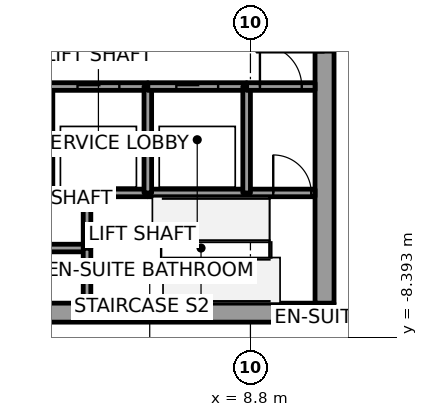
"""IFC4 building model, lengths in metres.
Left out: names, types, materials, properties, quantities, classifications, styles, units other than length and angle.
Written with IfcOpenShell. Run it as: python <this file> out.ifc"""

import sys

from ifc_helpers import new_model, si_unit, direction, frame, frame_2d, origin, place, context, subcontext, project, spatial, rectangle, extrude, element, fill, save


model = new_model("IFC4")
c1 = context("Model", 3, precision=1e-05, world=origin(), true_north=direction((0.0, 1.0)))
c2 = subcontext(c1, "Body", "Model", "MODEL_VIEW")
j1 = project(units=[si_unit("LENGTHUNIT", "METRE"), si_unit("PLANEANGLEUNIT", "RADIAN")], contexts=[c1])
p1 = place(None, origin())
s1 = spatial("IfcSite", under=j1, at=p1, CompositionType="ELEMENT")
p2 = place(p1, origin())
s2 = spatial("IfcBuilding", under=s1, at=p2, CompositionType="ELEMENT")
p3 = place(p2, frame((0.0, 0.0, 85.0)))
s3 = spatial("IfcBuildingStorey", under=s2, at=p3, CompositionType="ELEMENT", Elevation=85.0)
p4 = place(p3, frame((-11.0, -7.75, 0.0), z_axis=(0.0, 0.0, 1.0), x_axis=(1.0, 0.0, 0.0)))
e1 = element("IfcWall", 1, at=p4, inside=s3, PredefinedType="SHEAR", context=c2, shape_type="SweptSolid", body=[
    extrude(rectangle(XDim=22.0, YDim=0.5, at=frame_2d((11.0, 0.0))), origin(), (0.0, 0.0, 1.0), 3.7),
])
p5 = place(p4, frame((10.45, 0.0, 0.0)))
e2 = element("IfcOpeningElement", 2, at=p5, cuts=e1, PredefinedType="OPENING", context=c2, shape_type="SweptSolid", body=[
    extrude(rectangle(XDim=1.1, YDim=2.1, at=frame_2d((0.55, 1.05))), frame((0.0, 0.25, 0.0), z_axis=(0.0, -1.0, 0.0), x_axis=(1.0, 0.0, 0.0)), (0.0, 0.0, 1.0), 0.5),
])
p6 = place(p3, frame((10.75, -7.5, 0.0), z_axis=(0.0, 0.0, 1.0), x_axis=(0.0, 1.0, 0.0)))
e3 = element("IfcWall", 3, at=p6, inside=s3, PredefinedType="SHEAR", context=c2, shape_type="SweptSolid", body=[
    extrude(rectangle(XDim=15.0, YDim=0.5, at=frame_2d((7.5, 0.0))), origin(), (0.0, 0.0, 1.0), 3.7),
])
p7 = place(p6, frame((6.6, 0.0, 0.0)))
e4 = element("IfcOpeningElement", 4, at=p7, cuts=e3, PredefinedType="OPENING", context=c2, shape_type="SweptSolid", body=[
    extrude(rectangle(XDim=1.8, YDim=2.1, at=frame_2d((0.9, 1.05))), frame((0.0, 0.25, 0.0), z_axis=(0.0, -1.0, 0.0), x_axis=(1.0, 0.0, 0.0)), (0.0, 0.0, 1.0), 0.5),
])
p8 = place(p3, frame((4.5, -6.05, 0.0), z_axis=(0.0, 0.0, 1.0), x_axis=(-1.0, 0.0, 0.0)))
e5 = element("IfcWall", 5, at=p8, inside=s3, PredefinedType="SOLIDWALL", context=c2, shape_type="SweptSolid", body=[
    extrude(rectangle(XDim=3.6, YDim=0.2, at=frame_2d((1.8, 0.0))), origin(), (0.0, 0.0, 1.0), 3.55),
])
p9 = place(p3, frame((4.5, -4.6, 0.0), z_axis=(0.0, 0.0, 1.0), x_axis=(-1.0, 0.0, 0.0)))
e6 = element("IfcWall", 6, at=p9, inside=s3, PredefinedType="SOLIDWALL", context=c2, shape_type="SweptSolid", body=[
    extrude(rectangle(XDim=1.0, YDim=0.2, at=frame_2d((0.5, 0.0))), origin(), (0.0, 0.0, 1.0), 3.55),
])
p10 = place(p3, frame((3.5, -1.8, 0.0), z_axis=(0.0, 0.0, 1.0), x_axis=(1.0, 0.0, 0.0)))
e7 = element("IfcWall", 7, at=p10, inside=s3, PredefinedType="SOLIDWALL", context=c2, shape_type="SweptSolid", body=[
    extrude(rectangle(XDim=2.6, YDim=0.2, at=frame_2d((1.3, 0.0))), origin(), (0.0, 0.0, 1.0), 3.55),
])
p11 = place(p10, frame((0.75, 0.0, 0.0)))
e8 = element("IfcOpeningElement", 8, at=p11, cuts=e7, PredefinedType="OPENING", context=c2, shape_type="SweptSolid", body=[
    extrude(rectangle(XDim=1.1, YDim=2.1, at=frame_2d((0.55, 1.05))), frame((0.0, 0.1, 0.0), z_axis=(0.0, -1.0, 0.0), x_axis=(1.0, 0.0, 0.0)), (0.0, 0.0, 1.0), 0.2),
])
for number, where, z_axis, x_axis in (
    (9, (4.5, -7.5, 0.0), (0.0, 0.0, 1.0), (0.0, 1.0, 0.0)),
    (10, (4.5, -6.05, 0.0), (0.0, 0.0, 1.0), (0.0, 1.0, 0.0)),
):
    element("IfcWall", number, at=place(p3, frame(where, z_axis=z_axis, x_axis=x_axis)), inside=s3, PredefinedType="SOLIDWALL", context=c2, shape_type="SweptSolid", body=[
        extrude(rectangle(XDim=1.45, YDim=0.2, at=frame_2d((0.725, 0.0))), origin(), (0.0, 0.0, 1.0), 3.55),
    ])
p12 = place(p3, frame((4.5, -4.6, 0.0), z_axis=(0.0, 0.0, 1.0), x_axis=(1.0, 0.0, 0.0)))
e11 = element("IfcWall", 11, at=p12, inside=s3, PredefinedType="SOLIDWALL", context=c2, shape_type="SweptSolid", body=[
    extrude(rectangle(XDim=1.6, YDim=0.2, at=frame_2d((0.8, 0.0))), origin(), (0.0, 0.0, 1.0), 3.55),
])
p13 = place(p3, frame((6.1, -4.6, 0.0), z_axis=(0.0, 0.0, 1.0), x_axis=(1.0, 0.0, 0.0)))
e12 = element("IfcWall", 12, at=p13, inside=s3, PredefinedType="SOLIDWALL", context=c2, shape_type="SweptSolid", body=[
    extrude(rectangle(XDim=2.6, YDim=0.2, at=frame_2d((1.3, 0.0))), origin(), (0.0, 0.0, 1.0), 3.55),
])
p14 = place(p3, frame((6.1, -4.6, 0.0), z_axis=(0.0, 0.0, 1.0), x_axis=(0.0, 1.0, 0.0)))
e13 = element("IfcWall", 13, at=p14, inside=s3, PredefinedType="SOLIDWALL", context=c2, shape_type="SweptSolid", body=[
    extrude(rectangle(XDim=2.8, YDim=0.2, at=frame_2d((1.4, 0.0))), origin(), (0.0, 0.0, 1.0), 3.55),
])
p15 = place(p3, frame((6.1, -1.8, 0.0), z_axis=(0.0, 0.0, 1.0), x_axis=(1.0, 0.0, 0.0)))
e14 = element("IfcWall", 14, at=p15, inside=s3, PredefinedType="SOLIDWALL", context=c2, shape_type="SweptSolid", body=[
    extrude(rectangle(XDim=2.6, YDim=0.2, at=frame_2d((1.3, 0.0))), origin(), (0.0, 0.0, 1.0), 3.55),
])
p16 = place(p15, frame((0.75, 0.0, 0.0)))
e15 = element("IfcOpeningElement", 15, at=p16, cuts=e14, PredefinedType="OPENING", context=c2, shape_type="SweptSolid", body=[
    extrude(rectangle(XDim=1.1, YDim=2.1, at=frame_2d((0.55, 1.05))), frame((0.0, 0.1, 0.0), z_axis=(0.0, -1.0, 0.0), x_axis=(1.0, 0.0, 0.0)), (0.0, 0.0, 1.0), 0.2),
])
p17 = place(p3, frame((8.7, -4.6, 0.0), z_axis=(0.0, 0.0, 1.0), x_axis=(1.0, 0.0, 0.0)))
e16 = element("IfcWall", 16, at=p17, inside=s3, PredefinedType="SOLIDWALL", context=c2, shape_type="SweptSolid", body=[
    extrude(rectangle(XDim=1.8, YDim=0.2, at=frame_2d((0.9, 0.0))), origin(), (0.0, 0.0, 1.0), 3.55),
])
p18 = place(p17, frame((0.7, 0.0, 0.0)))
e17 = element("IfcOpeningElement", 17, at=p18, cuts=e16, PredefinedType="OPENING", context=c2, shape_type="SweptSolid", body=[
    extrude(rectangle(XDim=1.0, YDim=2.1, at=frame_2d((0.5, 1.05))), frame((0.0, 0.1, 0.0), z_axis=(0.0, -1.0, 0.0), x_axis=(1.0, 0.0, 0.0)), (0.0, 0.0, 1.0), 0.2),
])
p19 = place(p3, frame((8.7, -1.8, 0.0), z_axis=(0.0, 0.0, 1.0), x_axis=(0.0, -1.0, 0.0)))
e18 = element("IfcWall", 18, at=p19, inside=s3, PredefinedType="SOLIDWALL", context=c2, shape_type="SweptSolid", body=[
    extrude(rectangle(XDim=2.8, YDim=0.2, at=frame_2d((1.4, 0.0))), origin(), (0.0, 0.0, 1.0), 3.55),
])
p20 = place(p3, frame((8.7, -1.8, 0.0), z_axis=(0.0, 0.0, 1.0), x_axis=(1.0, 0.0, 0.0)))
e19 = element("IfcWall", 19, at=p20, inside=s3, PredefinedType="SOLIDWALL", context=c2, shape_type="SweptSolid", body=[
    extrude(rectangle(XDim=1.8, YDim=0.2, at=frame_2d((0.9, 0.0))), origin(), (0.0, 0.0, 1.0), 3.55),
])
p21 = place(p20, frame((0.35, 0.0, 0.0)))
e20 = element("IfcOpeningElement", 20, at=p21, cuts=e19, PredefinedType="OPENING", context=c2, shape_type="SweptSolid", body=[
    extrude(rectangle(XDim=1.1, YDim=2.1, at=frame_2d((0.55, 1.05))), frame((0.0, 0.1, 0.0), z_axis=(0.0, -1.0, 0.0), x_axis=(1.0, 0.0, 0.0)), (0.0, 0.0, 1.0), 0.2),
])
p22 = place(p11, origin())
e21 = element("IfcDoor", 21, at=p22, inside=s3, OperationType="SLIDING_TO_LEFT", PredefinedType="DOOR", context=c2, shape_type="SweptSolid", body=[
    extrude(rectangle(XDim=1.1, YDim=2.1, at=frame_2d((0.55, 1.05))), frame((0.0, 0.025, 0.0), z_axis=(0.0, -1.0, 0.0), x_axis=(1.0, 0.0, 0.0)), (0.0, 0.0, 1.0), 0.05),
])
fill(e8, e21)
p23 = place(p16, origin())
e22 = element("IfcDoor", 22, at=p23, inside=s3, OperationType="SLIDING_TO_RIGHT", PredefinedType="DOOR", context=c2, shape_type="SweptSolid", body=[
    extrude(rectangle(XDim=1.1, YDim=2.1, at=frame_2d((0.55, 1.05))), frame((0.0, 0.025, 0.0), z_axis=(0.0, -1.0, 0.0), x_axis=(1.0, 0.0, 0.0)), (0.0, 0.0, 1.0), 0.05),
])
fill(e15, e22)
p24 = place(p21, origin())
e23 = element("IfcDoor", 23, at=p24, inside=s3, OperationType="SINGLE_SWING_LEFT", PredefinedType="DOOR", context=c2, shape_type="SweptSolid", body=[
    extrude(rectangle(XDim=1.1, YDim=2.1, at=frame_2d((0.55, 1.05))), frame((0.0, 0.025, 0.0), z_axis=(0.0, -1.0, 0.0), x_axis=(1.0, 0.0, 0.0)), (0.0, 0.0, 1.0), 0.05),
])
fill(e20, e23)
p25 = place(p18, origin())
e24 = element("IfcDoor", 24, at=p25, inside=s3, OperationType="SINGLE_SWING_RIGHT", PredefinedType="DOOR", context=c2, shape_type="SweptSolid", body=[
    extrude(rectangle(XDim=1.0, YDim=2.1, at=frame_2d((0.5, 1.05))), frame((0.0, 0.025, 0.0), z_axis=(0.0, -1.0, 0.0), x_axis=(1.0, 0.0, 0.0)), (0.0, 0.0, 1.0), 0.05),
])
fill(e17, e24)
p26 = place(p7, origin())
e25 = element("IfcDoor", 25, at=p26, inside=s3, OperationType="DOUBLE_DOOR_SINGLE_SWING", PredefinedType="DOOR", context=c2, shape_type="SweptSolid", body=[
    extrude(rectangle(XDim=1.8, YDim=2.1, at=frame_2d((0.9, 1.05))), frame((0.0, 0.025, 0.0), z_axis=(0.0, -1.0, 0.0), x_axis=(1.0, 0.0, 0.0)), (0.0, 0.0, 1.0), 0.05),
])
fill(e4, e25)
save(model, sys.argv[1])
